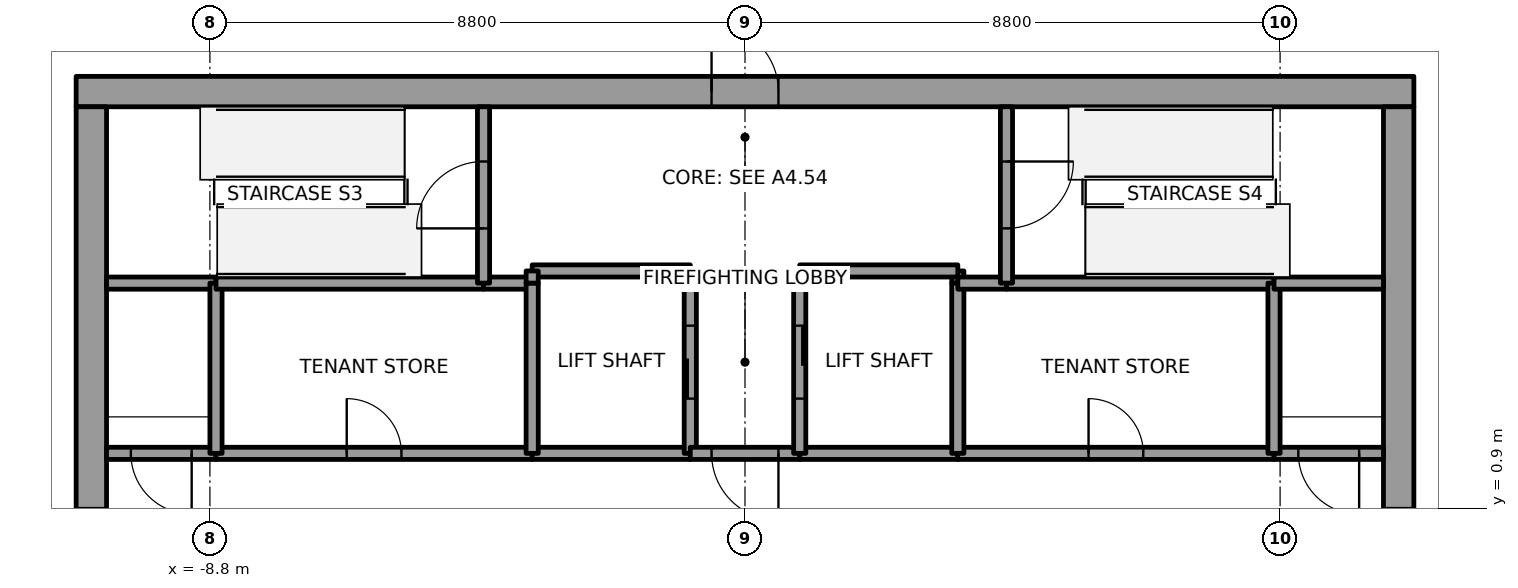
"""IFC4 building model, lengths in metres.
Left out: names, types, materials, properties, quantities, classifications, styles, units other than length and angle.
Written with IfcOpenShell. Run it as: python <this file> out.ifc"""

import sys

from ifc_helpers import new_model, si_unit, direction, frame, frame_2d, origin, place, context, subcontext, project, spatial, rectangle, extrude, element, fill, save


model = new_model("IFC4")
c1 = context("Model", 3, precision=1e-05, world=origin(), true_north=direction((0.0, 1.0)))
c2 = subcontext(c1, "Body", "Model", "MODEL_VIEW")
j1 = project(units=[si_unit("LENGTHUNIT", "METRE"), si_unit("PLANEANGLEUNIT", "RADIAN")], contexts=[c1])
p1 = place(None, origin())
s1 = spatial("IfcSite", under=j1, at=p1, CompositionType="ELEMENT")
p2 = place(p1, origin())
s2 = spatial("IfcBuilding", under=s1, at=p2, CompositionType="ELEMENT")
p3 = place(p2, frame((0.0, 0.0, 235.0)))
s3 = spatial("IfcBuildingStorey", under=s2, at=p3, CompositionType="ELEMENT", Elevation=235.0)
p4 = place(p3, frame((-11.0, 7.75, 0.0), z_axis=(0.0, 0.0, 1.0), x_axis=(1.0, 0.0, 0.0)))
e1 = element("IfcWall", 1, at=p4, inside=s3, PredefinedType="SHEAR", context=c2, shape_type="SweptSolid", body=[
    extrude(rectangle(XDim=22.0, YDim=0.5, at=frame_2d((11.0, 0.0))), origin(), (0.0, 0.0, 1.0), 4.0),
])
p5 = place(p4, frame((10.45, 0.0, 0.0)))
e2 = element("IfcOpeningElement", 2, at=p5, cuts=e1, PredefinedType="OPENING", context=c2, shape_type="SweptSolid", body=[
    extrude(rectangle(XDim=1.1, YDim=2.1, at=frame_2d((0.55, 1.05))), frame((0.0, 0.25, 0.0), z_axis=(0.0, -1.0, 0.0), x_axis=(1.0, 0.0, 0.0)), (0.0, 0.0, 1.0), 0.5),
])
p6 = place(p3, frame((-10.75, -7.5, 0.0), z_axis=(0.0, 0.0, 1.0), x_axis=(0.0, 1.0, 0.0)))
e3 = element("IfcWall", 3, at=p6, inside=s3, PredefinedType="SHEAR", context=c2, shape_type="SweptSolid", body=[
    extrude(rectangle(XDim=15.0, YDim=0.5, at=frame_2d((7.5, 0.0))), origin(), (0.0, 0.0, 1.0), 4.0),
])
p7 = place(p6, frame((6.6, 0.0, 0.0)))
e4 = element("IfcOpeningElement", 4, at=p7, cuts=e3, PredefinedType="OPENING", context=c2, shape_type="SweptSolid", body=[
    extrude(rectangle(XDim=1.8, YDim=2.1, at=frame_2d((0.9, 1.05))), frame((0.0, 0.25, 0.0), z_axis=(0.0, -1.0, 0.0), x_axis=(1.0, 0.0, 0.0)), (0.0, 0.0, 1.0), 0.5),
])
p8 = place(p3, frame((10.75, -7.5, 0.0), z_axis=(0.0, 0.0, 1.0), x_axis=(0.0, 1.0, 0.0)))
e5 = element("IfcWall", 5, at=p8, inside=s3, PredefinedType="SHEAR", context=c2, shape_type="SweptSolid", body=[
    extrude(rectangle(XDim=15.0, YDim=0.5, at=frame_2d((7.5, 0.0))), origin(), (0.0, 0.0, 1.0), 4.0),
])
p9 = place(p8, frame((6.6, 0.0, 0.0)))
e6 = element("IfcOpeningElement", 6, at=p9, cuts=e5, PredefinedType="OPENING", context=c2, shape_type="SweptSolid", body=[
    extrude(rectangle(XDim=1.8, YDim=2.1, at=frame_2d((0.9, 1.05))), frame((0.0, 0.25, 0.0), z_axis=(0.0, -1.0, 0.0), x_axis=(1.0, 0.0, 0.0)), (0.0, 0.0, 1.0), 0.5),
])
p10 = place(p3, frame((-8.7, 1.8, 0.0), z_axis=(0.0, 0.0, 1.0), x_axis=(-1.0, 0.0, 0.0)))
e7 = element("IfcWall", 7, at=p10, inside=s3, PredefinedType="SOLIDWALL", context=c2, shape_type="SweptSolid", body=[
    extrude(rectangle(XDim=1.8, YDim=0.2, at=frame_2d((0.9, 0.0))), origin(), (0.0, 0.0, 1.0), 3.85),
])
p11 = place(p10, frame((0.4, 0.0, 0.0)))
e8 = element("IfcOpeningElement", 8, at=p11, cuts=e7, PredefinedType="OPENING", context=c2, shape_type="SweptSolid", body=[
    extrude(rectangle(XDim=1.0, YDim=2.1, at=frame_2d((0.5, 1.05))), frame((0.0, 0.1, 0.0), z_axis=(0.0, -1.0, 0.0), x_axis=(1.0, 0.0, 0.0)), (0.0, 0.0, 1.0), 0.2),
])
p12 = place(p3, frame((-8.7, 4.6, 0.0), z_axis=(0.0, 0.0, 1.0), x_axis=(-1.0, 0.0, 0.0)))
e9 = element("IfcWall", 9, at=p12, inside=s3, PredefinedType="SOLIDWALL", context=c2, shape_type="SweptSolid", body=[
    extrude(rectangle(XDim=1.8, YDim=0.2, at=frame_2d((0.9, 0.0))), origin(), (0.0, 0.0, 1.0), 3.85),
])
p13 = place(p3, frame((-8.7, 1.8, 0.0), z_axis=(0.0, 0.0, 1.0), x_axis=(1.0, 0.0, 0.0)))
e10 = element("IfcWall", 10, at=p13, inside=s3, PredefinedType="SOLIDWALL", context=c2, shape_type="SweptSolid", body=[
    extrude(rectangle(XDim=5.2, YDim=0.2, at=frame_2d((2.6, 0.0))), origin(), (0.0, 0.0, 1.0), 3.85),
])
p14 = place(p13, frame((2.15, 0.0, 0.0)))
e11 = element("IfcOpeningElement", 11, at=p14, cuts=e10, PredefinedType="OPENING", context=c2, shape_type="SweptSolid", body=[
    extrude(rectangle(XDim=0.9, YDim=2.1, at=frame_2d((0.45, 1.05))), frame((0.0, 0.1, 0.0), z_axis=(0.0, -1.0, 0.0), x_axis=(1.0, 0.0, 0.0)), (0.0, 0.0, 1.0), 0.2),
])
p15 = place(p3, frame((-8.7, 4.6, 0.0), z_axis=(0.0, 0.0, 1.0), x_axis=(0.0, -1.0, 0.0)))
e12 = element("IfcWall", 12, at=p15, inside=s3, PredefinedType="SOLIDWALL", context=c2, shape_type="SweptSolid", body=[
    extrude(rectangle(XDim=2.8, YDim=0.2, at=frame_2d((1.4, 0.0))), origin(), (0.0, 0.0, 1.0), 3.85),
])
p16 = place(p3, frame((-4.3, 4.6, 0.0), z_axis=(0.0, 0.0, 1.0), x_axis=(-1.0, 0.0, 0.0)))
e13 = element("IfcWall", 13, at=p16, inside=s3, PredefinedType="SOLIDWALL", context=c2, shape_type="SweptSolid", body=[
    extrude(rectangle(XDim=4.4, YDim=0.2, at=frame_2d((2.2, 0.0))), origin(), (0.0, 0.0, 1.0), 3.85),
])
p17 = place(p3, frame((-3.5, 4.6, 0.0), z_axis=(0.0, 0.0, 1.0), x_axis=(-1.0, 0.0, 0.0)))
e14 = element("IfcWall", 14, at=p17, inside=s3, PredefinedType="SOLIDWALL", context=c2, shape_type="SweptSolid", body=[
    extrude(rectangle(XDim=0.8, YDim=0.2, at=frame_2d((0.4, 0.0))), origin(), (0.0, 0.0, 1.0), 3.85),
])
p18 = place(p3, frame((-4.3, 4.6, 0.0), z_axis=(0.0, 0.0, 1.0), x_axis=(0.0, 1.0, 0.0)))
e15 = element("IfcWall", 15, at=p18, inside=s3, PredefinedType="SOLIDWALL", context=c2, shape_type="SweptSolid", body=[
    extrude(rectangle(XDim=2.9, YDim=0.2, at=frame_2d((1.45, 0.0))), origin(), (0.0, 0.0, 1.0), 3.85),
])
p19 = place(p18, frame((0.9, 0.0, 0.0)))
e16 = element("IfcOpeningElement", 16, at=p19, cuts=e15, PredefinedType="OPENING", context=c2, shape_type="SweptSolid", body=[
    extrude(rectangle(XDim=1.1, YDim=2.1, at=frame_2d((0.55, 1.05))), frame((0.0, 0.1, 0.0), z_axis=(0.0, -1.0, 0.0), x_axis=(1.0, 0.0, 0.0)), (0.0, 0.0, 1.0), 0.2),
])
p20 = place(p3, frame((-0.9, 1.8, 0.0), z_axis=(0.0, 0.0, 1.0), x_axis=(-1.0, 0.0, 0.0)))
e17 = element("IfcWall", 17, at=p20, inside=s3, PredefinedType="SOLIDWALL", context=c2, shape_type="SweptSolid", body=[
    extrude(rectangle(XDim=2.6, YDim=0.2, at=frame_2d((1.3, 0.0))), origin(), (0.0, 0.0, 1.0), 3.85),
])
p21 = place(p3, frame((-3.5, 1.8, 0.0), z_axis=(0.0, 0.0, 1.0), x_axis=(0.0, 1.0, 0.0)))
e18 = element("IfcWall", 18, at=p21, inside=s3, PredefinedType="SOLIDWALL", context=c2, shape_type="SweptSolid", body=[
    extrude(rectangle(XDim=2.8, YDim=0.2, at=frame_2d((1.4, 0.0))), origin(), (0.0, 0.0, 1.0), 3.85),
])
p22 = place(p3, frame((-0.9, 1.8, 0.0), z_axis=(0.0, 0.0, 1.0), x_axis=(0.0, 1.0, 0.0)))
e19 = element("IfcWall", 19, at=p22, inside=s3, PredefinedType="SOLIDWALL", context=c2, shape_type="SweptSolid", body=[
    extrude(rectangle(XDim=3.0, YDim=0.2, at=frame_2d((1.5, 0.0))), origin(), (0.0, 0.0, 1.0), 3.85),
])
p23 = place(p22, frame((0.9, 0.0, 0.0)))
e20 = element("IfcOpeningElement", 20, at=p23, cuts=e19, PredefinedType="OPENING", context=c2, shape_type="SweptSolid", body=[
    extrude(rectangle(XDim=1.2, YDim=2.1, at=frame_2d((0.6, 1.05))), frame((0.0, 0.1, 0.0), z_axis=(0.0, -1.0, 0.0), x_axis=(1.0, 0.0, 0.0)), (0.0, 0.0, 1.0), 0.2),
])
p24 = place(p3, frame((-0.9, 4.8, 0.0), z_axis=(0.0, 0.0, 1.0), x_axis=(-1.0, 0.0, 0.0)))
e21 = element("IfcWall", 21, at=p24, inside=s3, PredefinedType="SOLIDWALL", context=c2, shape_type="SweptSolid", body=[
    extrude(rectangle(XDim=2.6, YDim=0.2, at=frame_2d((1.3, 0.0))), origin(), (0.0, 0.0, 1.0), 3.85),
])
p25 = place(p3, frame((-3.5, 4.8, 0.0), z_axis=(0.0, 0.0, 1.0), x_axis=(0.0, -1.0, 0.0)))
e22 = element("IfcWall", 22, at=p25, inside=s3, PredefinedType="SOLIDWALL", context=c2, shape_type="SweptSolid", body=[
    extrude(rectangle(XDim=0.2, YDim=0.2, at=frame_2d((0.1, 0.0))), origin(), (0.0, 0.0, 1.0), 3.85),
])
p26 = place(p3, frame((0.9, 1.8, 0.0), z_axis=(0.0, 0.0, 1.0), x_axis=(-1.0, 0.0, 0.0)))
e23 = element("IfcWall", 23, at=p26, inside=s3, PredefinedType="SOLIDWALL", context=c2, shape_type="SweptSolid", body=[
    extrude(rectangle(XDim=1.8, YDim=0.2, at=frame_2d((0.9, 0.0))), origin(), (0.0, 0.0, 1.0), 3.85),
])
p27 = place(p26, frame((0.35, 0.0, 0.0)))
e24 = element("IfcOpeningElement", 24, at=p27, cuts=e23, PredefinedType="OPENING", context=c2, shape_type="SweptSolid", body=[
    extrude(rectangle(XDim=1.1, YDim=2.1, at=frame_2d((0.55, 1.05))), frame((0.0, 0.1, 0.0), z_axis=(0.0, -1.0, 0.0), x_axis=(1.0, 0.0, 0.0)), (0.0, 0.0, 1.0), 0.2),
])
p28 = place(p3, frame((3.5, 1.8, 0.0), z_axis=(0.0, 0.0, 1.0), x_axis=(-1.0, 0.0, 0.0)))
e25 = element("IfcWall", 25, at=p28, inside=s3, PredefinedType="SOLIDWALL", context=c2, shape_type="SweptSolid", body=[
    extrude(rectangle(XDim=2.6, YDim=0.2, at=frame_2d((1.3, 0.0))), origin(), (0.0, 0.0, 1.0), 3.85),
])
p29 = place(p3, frame((3.5, 4.6, 0.0), z_axis=(0.0, 0.0, 1.0), x_axis=(0.0, 1.0, 0.0)))
e26 = element("IfcWall", 26, at=p29, inside=s3, PredefinedType="SOLIDWALL", context=c2, shape_type="SweptSolid", body=[
    extrude(rectangle(XDim=0.2, YDim=0.2, at=frame_2d((0.1, 0.0))), origin(), (0.0, 0.0, 1.0), 3.85),
])
p30 = place(p3, frame((3.5, 4.8, 0.0), z_axis=(0.0, 0.0, 1.0), x_axis=(-1.0, 0.0, 0.0)))
e27 = element("IfcWall", 27, at=p30, inside=s3, PredefinedType="SOLIDWALL", context=c2, shape_type="SweptSolid", body=[
    extrude(rectangle(XDim=2.6, YDim=0.2, at=frame_2d((1.3, 0.0))), origin(), (0.0, 0.0, 1.0), 3.85),
])
p31 = place(p3, frame((0.9, 4.8, 0.0), z_axis=(0.0, 0.0, 1.0), x_axis=(0.0, -1.0, 0.0)))
e28 = element("IfcWall", 28, at=p31, inside=s3, PredefinedType="SOLIDWALL", context=c2, shape_type="SweptSolid", body=[
    extrude(rectangle(XDim=3.0, YDim=0.2, at=frame_2d((1.5, 0.0))), origin(), (0.0, 0.0, 1.0), 3.85),
])
p32 = place(p31, frame((0.9, 0.0, 0.0)))
e29 = element("IfcOpeningElement", 29, at=p32, cuts=e28, PredefinedType="OPENING", context=c2, shape_type="SweptSolid", body=[
    extrude(rectangle(XDim=1.2, YDim=2.1, at=frame_2d((0.6, 1.05))), frame((0.0, 0.1, 0.0), z_axis=(0.0, -1.0, 0.0), x_axis=(1.0, 0.0, 0.0)), (0.0, 0.0, 1.0), 0.2),
])
p33 = place(p3, frame((3.5, 1.8, 0.0), z_axis=(0.0, 0.0, 1.0), x_axis=(1.0, 0.0, 0.0)))
e30 = element("IfcWall", 30, at=p33, inside=s3, PredefinedType="SOLIDWALL", context=c2, shape_type="SweptSolid", body=[
    extrude(rectangle(XDim=5.2, YDim=0.2, at=frame_2d((2.6, 0.0))), origin(), (0.0, 0.0, 1.0), 3.85),
])
p34 = place(p33, frame((2.15, 0.0, 0.0)))
e31 = element("IfcOpeningElement", 31, at=p34, cuts=e30, PredefinedType="OPENING", context=c2, shape_type="SweptSolid", body=[
    extrude(rectangle(XDim=0.9, YDim=2.1, at=frame_2d((0.45, 1.05))), frame((0.0, 0.1, 0.0), z_axis=(0.0, -1.0, 0.0), x_axis=(1.0, 0.0, 0.0)), (0.0, 0.0, 1.0), 0.2),
])
p35 = place(p3, frame((3.5, 4.6, 0.0), z_axis=(0.0, 0.0, 1.0), x_axis=(0.0, -1.0, 0.0)))
e32 = element("IfcWall", 32, at=p35, inside=s3, PredefinedType="SOLIDWALL", context=c2, shape_type="SweptSolid", body=[
    extrude(rectangle(XDim=2.8, YDim=0.2, at=frame_2d((1.4, 0.0))), origin(), (0.0, 0.0, 1.0), 3.85),
])
p36 = place(p3, frame((4.3, 4.6, 0.0), z_axis=(0.0, 0.0, 1.0), x_axis=(-1.0, 0.0, 0.0)))
e33 = element("IfcWall", 33, at=p36, inside=s3, PredefinedType="SOLIDWALL", context=c2, shape_type="SweptSolid", body=[
    extrude(rectangle(XDim=0.8, YDim=0.2, at=frame_2d((0.4, 0.0))), origin(), (0.0, 0.0, 1.0), 3.85),
])
p37 = place(p3, frame((8.7, 4.6, 0.0), z_axis=(0.0, 0.0, 1.0), x_axis=(-1.0, 0.0, 0.0)))
e34 = element("IfcWall", 34, at=p37, inside=s3, PredefinedType="SOLIDWALL", context=c2, shape_type="SweptSolid", body=[
    extrude(rectangle(XDim=4.4, YDim=0.2, at=frame_2d((2.2, 0.0))), origin(), (0.0, 0.0, 1.0), 3.85),
])
p38 = place(p3, frame((4.3, 7.5, 0.0), z_axis=(0.0, 0.0, 1.0), x_axis=(0.0, -1.0, 0.0)))
e35 = element("IfcWall", 35, at=p38, inside=s3, PredefinedType="SOLIDWALL", context=c2, shape_type="SweptSolid", body=[
    extrude(rectangle(XDim=2.9, YDim=0.2, at=frame_2d((1.45, 0.0))), origin(), (0.0, 0.0, 1.0), 3.85),
])
p39 = place(p38, frame((0.9, 0.0, 0.0)))
e36 = element("IfcOpeningElement", 36, at=p39, cuts=e35, PredefinedType="OPENING", context=c2, shape_type="SweptSolid", body=[
    extrude(rectangle(XDim=1.1, YDim=2.1, at=frame_2d((0.55, 1.05))), frame((0.0, 0.1, 0.0), z_axis=(0.0, -1.0, 0.0), x_axis=(1.0, 0.0, 0.0)), (0.0, 0.0, 1.0), 0.2),
])
p40 = place(p3, frame((10.5, 1.8, 0.0), z_axis=(0.0, 0.0, 1.0), x_axis=(-1.0, 0.0, 0.0)))
e37 = element("IfcWall", 37, at=p40, inside=s3, PredefinedType="SOLIDWALL", context=c2, shape_type="SweptSolid", body=[
    extrude(rectangle(XDim=1.8, YDim=0.2, at=frame_2d((0.9, 0.0))), origin(), (0.0, 0.0, 1.0), 3.85),
])
p41 = place(p40, frame((0.4, 0.0, 0.0)))
e38 = element("IfcOpeningElement", 38, at=p41, cuts=e37, PredefinedType="OPENING", context=c2, shape_type="SweptSolid", body=[
    extrude(rectangle(XDim=1.0, YDim=2.1, at=frame_2d((0.5, 1.05))), frame((0.0, 0.1, 0.0), z_axis=(0.0, -1.0, 0.0), x_axis=(1.0, 0.0, 0.0)), (0.0, 0.0, 1.0), 0.2),
])
p42 = place(p3, frame((8.7, 1.8, 0.0), z_axis=(0.0, 0.0, 1.0), x_axis=(0.0, 1.0, 0.0)))
e39 = element("IfcWall", 39, at=p42, inside=s3, PredefinedType="SOLIDWALL", context=c2, shape_type="SweptSolid", body=[
    extrude(rectangle(XDim=2.8, YDim=0.2, at=frame_2d((1.4, 0.0))), origin(), (0.0, 0.0, 1.0), 3.85),
])
p43 = place(p3, frame((10.5, 4.6, 0.0), z_axis=(0.0, 0.0, 1.0), x_axis=(-1.0, 0.0, 0.0)))
e40 = element("IfcWall", 40, at=p43, inside=s3, PredefinedType="SOLIDWALL", context=c2, shape_type="SweptSolid", body=[
    extrude(rectangle(XDim=1.8, YDim=0.2, at=frame_2d((0.9, 0.0))), origin(), (0.0, 0.0, 1.0), 3.85),
])
p44 = place(p23, origin())
e41 = element("IfcDoor", 41, at=p44, inside=s3, OperationType="SLIDING_TO_RIGHT", PredefinedType="DOOR", context=c2, shape_type="SweptSolid", body=[
    extrude(rectangle(XDim=1.2, YDim=2.1, at=frame_2d((0.6, 1.05))), frame((0.0, 0.025, 0.0), z_axis=(0.0, -1.0, 0.0), x_axis=(1.0, 0.0, 0.0)), (0.0, 0.0, 1.0), 0.05),
])
fill(e20, e41)
p45 = place(p32, origin())
e42 = element("IfcDoor", 42, at=p45, inside=s3, OperationType="SLIDING_TO_RIGHT", PredefinedType="DOOR", context=c2, shape_type="SweptSolid", body=[
    extrude(rectangle(XDim=1.2, YDim=2.1, at=frame_2d((0.6, 1.05))), frame((0.0, 0.025, 0.0), z_axis=(0.0, -1.0, 0.0), x_axis=(1.0, 0.0, 0.0)), (0.0, 0.0, 1.0), 0.05),
])
fill(e29, e42)
p46 = place(p27, origin())
e43 = element("IfcDoor", 43, at=p46, inside=s3, OperationType="SINGLE_SWING_RIGHT", PredefinedType="DOOR", context=c2, shape_type="SweptSolid", body=[
    extrude(rectangle(XDim=1.1, YDim=2.1, at=frame_2d((0.55, 1.05))), frame((0.0, 0.025, 0.0), z_axis=(0.0, -1.0, 0.0), x_axis=(1.0, 0.0, 0.0)), (0.0, 0.0, 1.0), 0.05),
])
fill(e24, e43)
p47 = place(p11, origin())
e44 = element("IfcDoor", 44, at=p47, inside=s3, OperationType="SINGLE_SWING_LEFT", PredefinedType="DOOR", context=c2, shape_type="SweptSolid", body=[
    extrude(rectangle(XDim=1.0, YDim=2.1, at=frame_2d((0.5, 1.05))), frame((0.0, 0.025, 0.0), z_axis=(0.0, -1.0, 0.0), x_axis=(1.0, 0.0, 0.0)), (0.0, 0.0, 1.0), 0.05),
])
fill(e8, e44)
p48 = place(p41, origin())
e45 = element("IfcDoor", 45, at=p48, inside=s3, OperationType="SINGLE_SWING_LEFT", PredefinedType="DOOR", context=c2, shape_type="SweptSolid", body=[
    extrude(rectangle(XDim=1.0, YDim=2.1, at=frame_2d((0.5, 1.05))), frame((0.0, 0.025, 0.0), z_axis=(0.0, -1.0, 0.0), x_axis=(1.0, 0.0, 0.0)), (0.0, 0.0, 1.0), 0.05),
])
fill(e38, e45)
p49 = place(p19, origin())
e46 = element("IfcDoor", 46, at=p49, inside=s3, OperationType="SINGLE_SWING_RIGHT", PredefinedType="DOOR", context=c2, shape_type="SweptSolid", body=[
    extrude(rectangle(XDim=1.1, YDim=2.1, at=frame_2d((0.55, 1.05))), frame((0.0, 0.025, 0.0), z_axis=(0.0, -1.0, 0.0), x_axis=(1.0, 0.0, 0.0)), (0.0, 0.0, 1.0), 0.05),
])
fill(e16, e46)
p50 = place(p39, origin())
e47 = element("IfcDoor", 47, at=p50, inside=s3, OperationType="SINGLE_SWING_LEFT", PredefinedType="DOOR", context=c2, shape_type="SweptSolid", body=[
    extrude(rectangle(XDim=1.1, YDim=2.1, at=frame_2d((0.55, 1.05))), frame((0.0, 0.025, 0.0), z_axis=(0.0, -1.0, 0.0), x_axis=(1.0, 0.0, 0.0)), (0.0, 0.0, 1.0), 0.05),
])
fill(e36, e47)
p51 = place(p34, origin())
e48 = element("IfcDoor", 48, at=p51, inside=s3, OperationType="SINGLE_SWING_LEFT", PredefinedType="DOOR", context=c2, shape_type="SweptSolid", body=[
    extrude(rectangle(XDim=0.9, YDim=2.1, at=frame_2d((0.45, 1.05))), frame((0.0, 0.025, 0.0), z_axis=(0.0, -1.0, 0.0), x_axis=(1.0, 0.0, 0.0)), (0.0, 0.0, 1.0), 0.05),
])
fill(e31, e48)
p52 = place(p14, origin())
e49 = element("IfcDoor", 49, at=p52, inside=s3, OperationType="SINGLE_SWING_RIGHT", PredefinedType="DOOR", context=c2, shape_type="SweptSolid", body=[
    extrude(rectangle(XDim=0.9, YDim=2.1, at=frame_2d((0.45, 1.05))), frame((0.0, 0.025, 0.0), z_axis=(0.0, -1.0, 0.0), x_axis=(1.0, 0.0, 0.0)), (0.0, 0.0, 1.0), 0.05),
])
fill(e11, e49)
p53 = place(p7, origin())
e50 = element("IfcDoor", 50, at=p53, inside=s3, OperationType="DOUBLE_DOOR_SINGLE_SWING", PredefinedType="DOOR", context=c2, shape_type="SweptSolid", body=[
    extrude(rectangle(XDim=1.8, YDim=2.1, at=frame_2d((0.9, 1.05))), frame((0.0, 0.025, 0.0), z_axis=(0.0, -1.0, 0.0), x_axis=(1.0, 0.0, 0.0)), (0.0, 0.0, 1.0), 0.05),
])
fill(e4, e50)
p54 = place(p9, origin())
e51 = element("IfcDoor", 51, at=p54, inside=s3, OperationType="DOUBLE_DOOR_SINGLE_SWING", PredefinedType="DOOR", context=c2, shape_type="SweptSolid", body=[
    extrude(rectangle(XDim=1.8, YDim=2.1, at=frame_2d((0.9, 1.05))), frame((0.0, 0.025, 0.0), z_axis=(0.0, -1.0, 0.0), x_axis=(1.0, 0.0, 0.0)), (0.0, 0.0, 1.0), 0.05),
])
fill(e6, e51)
p55 = place(p5, origin())
e52 = element("IfcDoor", 52, at=p55, inside=s3, OperationType="SINGLE_SWING_RIGHT", PredefinedType="DOOR", context=c2, shape_type="SweptSolid", body=[
    extrude(rectangle(XDim=1.1, YDim=2.1, at=frame_2d((0.55, 1.05))), frame((0.0, 0.025, 0.0), z_axis=(0.0, -1.0, 0.0), x_axis=(1.0, 0.0, 0.0)), (0.0, 0.0, 1.0), 0.05),
])
fill(e2, e52)
save(model, sys.argv[1])
